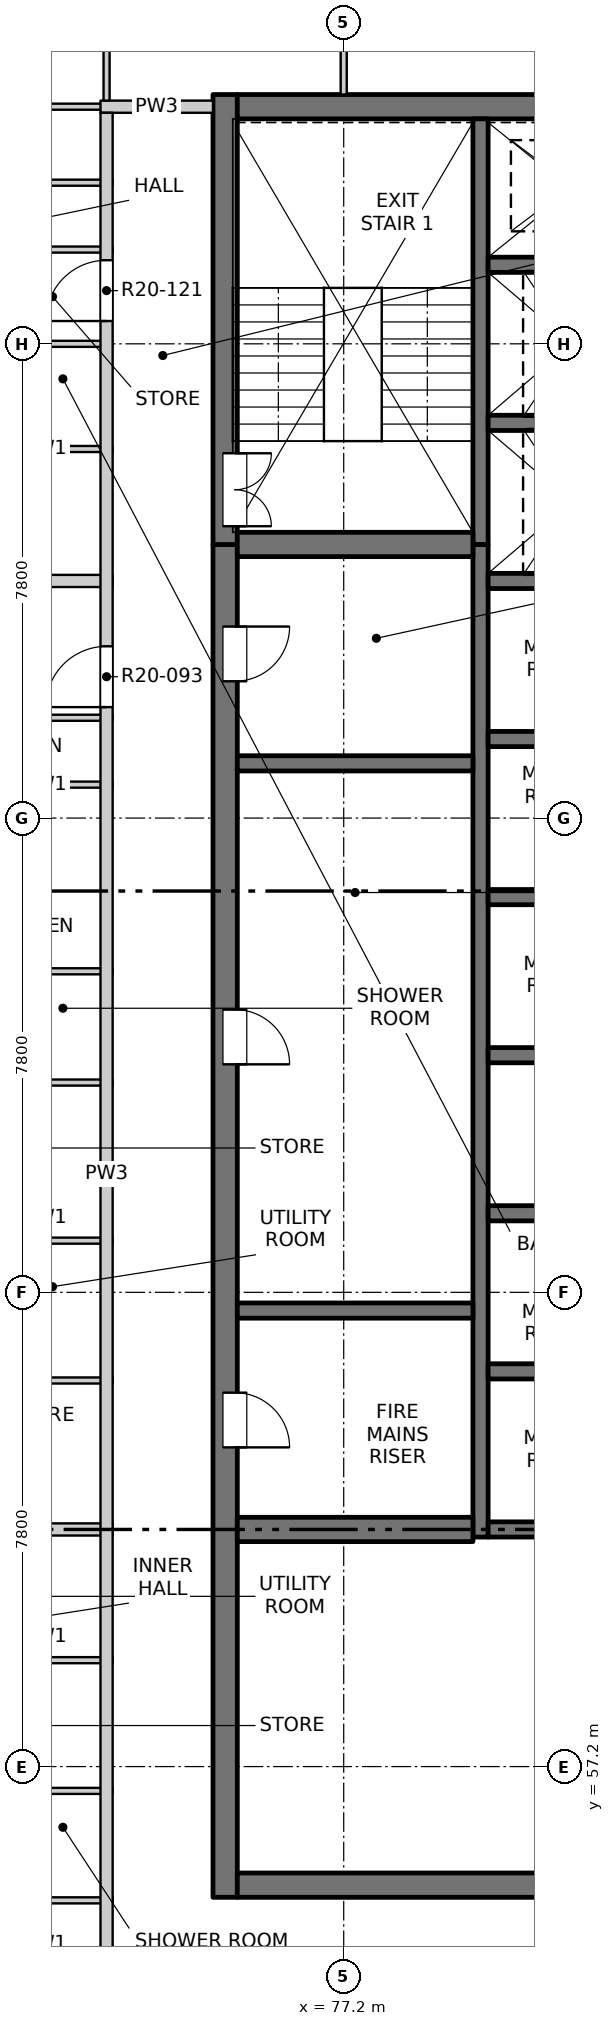
"""IFC4 building model, lengths in metres.
Left out: names, types, materials, properties, quantities, classifications, styles, units other than length and angle.
Written with IfcOpenShell. Run it as: python <this file> out.ifc"""

import sys

from ifc_helpers import new_model, si_unit, direction, frame, frame_2d, origin, place, context, subcontext, project, spatial, rectangle, extrude, element, fill, save


model = new_model("IFC4")
c1 = context("Model", 3, precision=1e-05, world=origin(), true_north=direction((0.0, 1.0)))
c2 = subcontext(c1, "Body", "Model", "MODEL_VIEW")
j1 = project(units=[si_unit("LENGTHUNIT", "METRE"), si_unit("PLANEANGLEUNIT", "RADIAN")], contexts=[c1])
p1 = place(None, origin())
s1 = spatial("IfcSite", under=j1, at=p1, CompositionType="ELEMENT")
p2 = place(p1, origin())
s2 = spatial("IfcBuilding", under=s1, at=p2, CompositionType="ELEMENT")
p3 = place(p2, frame((0.0, 0.0, 210.9)))
s3 = spatial("IfcBuildingStorey", under=s2, at=p3, CompositionType="ELEMENT", Elevation=210.9)
p4 = place(p3, frame((75.25, 55.05, -0.25), z_axis=(0.0, 0.0, 1.0), x_axis=(0.0, 1.0, 0.0)))
e1 = element("IfcWall", 1, at=p4, inside=s3, PredefinedType="SOLIDWALL", context=c2, shape_type="SweptSolid", body=[
    extrude(rectangle(XDim=22.25, YDim=0.4, at=frame_2d((11.125, 0.0))), origin(), (0.0, 0.0, 1.0), 3.4),
])
p5 = place(p4, frame((7.4, 0.0, 0.25)))
e2 = element("IfcOpeningElement", 2, at=p5, cuts=e1, PredefinedType="OPENING", context=c2, shape_type="SweptSolid", body=[
    extrude(rectangle(XDim=0.9, YDim=2.1, at=frame_2d((0.45, 1.05))), frame((0.0, 0.21, 0.0), z_axis=(0.0, -1.0, 0.0), x_axis=(1.0, 0.0, 0.0)), (0.0, 0.0, 1.0), 0.42),
])
p6 = place(p4, frame((13.7, 0.0, 0.25)))
e3 = element("IfcOpeningElement", 3, at=p6, cuts=e1, PredefinedType="OPENING", context=c2, shape_type="SweptSolid", body=[
    extrude(rectangle(XDim=0.9, YDim=2.1, at=frame_2d((0.45, 1.05))), frame((0.0, 0.21, 0.0), z_axis=(0.0, -1.0, 0.0), x_axis=(1.0, 0.0, 0.0)), (0.0, 0.0, 1.0), 0.42),
])
p7 = place(p4, frame((20.0, 0.0, 0.25)))
e4 = element("IfcOpeningElement", 4, at=p7, cuts=e1, PredefinedType="OPENING", context=c2, shape_type="SweptSolid", body=[
    extrude(rectangle(XDim=0.9, YDim=2.1, at=frame_2d((0.45, 1.05))), frame((0.0, 0.21, 0.0), z_axis=(0.0, -1.0, 0.0), x_axis=(1.0, 0.0, 0.0)), (0.0, 0.0, 1.0), 0.42),
])
p8 = place(p3, frame((75.25, 77.3, -0.25), z_axis=(0.0, 0.0, 1.0), x_axis=(0.0, 1.0, 0.0)))
e5 = element("IfcWall", 5, at=p8, inside=s3, PredefinedType="SOLIDWALL", context=c2, shape_type="SweptSolid", body=[
    extrude(rectangle(XDim=7.4, YDim=0.4, at=frame_2d((3.7, 0.0))), origin(), (0.0, 0.0, 1.0), 3.4),
])
p9 = place(p8, frame((0.3, 0.0, 0.25)))
e6 = element("IfcOpeningElement", 6, at=p9, cuts=e5, PredefinedType="OPENING", context=c2, shape_type="SweptSolid", body=[
    extrude(rectangle(XDim=1.2, YDim=2.1, at=frame_2d((0.6, 1.05))), frame((0.0, 0.21, 0.0), z_axis=(0.0, -1.0, 0.0), x_axis=(1.0, 0.0, 0.0)), (0.0, 0.0, 1.0), 0.42),
])
p10 = place(p3, frame((75.45, 55.25, -0.25), z_axis=(0.0, 0.0, 1.0), x_axis=(1.0, 0.0, 0.0)))
e7 = element("IfcWall", 7, at=p10, inside=s3, PredefinedType="SOLIDWALL", context=c2, shape_type="SweptSolid", body=[
    extrude(rectangle(XDim=19.1, YDim=0.4, at=frame_2d((9.55, 0.0))), origin(), (0.0, 0.0, 1.0), 3.4),
])
p11 = place(p10, frame((8.8, 0.0, 0.25)))
e8 = element("IfcOpeningElement", 8, at=p11, cuts=e7, PredefinedType="OPENING", context=c2, shape_type="SweptSolid", body=[
    extrude(rectangle(XDim=1.5, YDim=2.1, at=frame_2d((0.75, 1.05))), frame((0.0, 0.21, 0.0), z_axis=(0.0, -1.0, 0.0), x_axis=(1.0, 0.0, 0.0)), (0.0, 0.0, 1.0), 0.42),
])
p12 = place(p3, frame((75.45, 84.5, -0.25), z_axis=(0.0, 0.0, 1.0), x_axis=(1.0, 0.0, 0.0)))
e9 = element("IfcWall", 9, at=p12, inside=s3, PredefinedType="SOLIDWALL", context=c2, shape_type="SweptSolid", body=[
    extrude(rectangle(XDim=19.1, YDim=0.4, at=frame_2d((9.55, 0.0))), origin(), (0.0, 0.0, 1.0), 3.4),
])
p13 = place(p3, frame((79.45, 60.975, -0.25), z_axis=(0.0, 0.0, 1.0), x_axis=(0.0, 1.0, 0.0)))
e10 = element("IfcWall", 10, at=p13, inside=s3, PredefinedType="SOLIDWALL", context=c2, shape_type="SweptSolid", body=[
    extrude(rectangle(XDim=16.325, YDim=0.25, at=frame_2d((8.163, 0.0))), origin(), (0.0, 0.0, 1.0), 3.4),
])
p14 = place(p3, frame((79.45, 77.3, -0.25), z_axis=(0.0, 0.0, 1.0), x_axis=(0.0, 1.0, 0.0)))
e11 = element("IfcWall", 11, at=p14, inside=s3, PredefinedType="SOLIDWALL", context=c2, shape_type="SweptSolid", body=[
    extrude(rectangle(XDim=7.0, YDim=0.25, at=frame_2d((3.5, 0.0))), origin(), (0.0, 0.0, 1.0), 3.4),
])
for number, where, z_axis, x_axis in (
    (12, (79.575, 61.1, -0.25), (0.0, 0.0, 1.0), (1.0, 0.0, 0.0)),
    (13, (79.575, 63.7, -0.25), (0.0, 0.0, 1.0), (1.0, 0.0, 0.0)),
    (14, (79.575, 66.3, -0.25), (0.0, 0.0, 1.0), (1.0, 0.0, 0.0)),
    (15, (79.575, 68.9, -0.25), (0.0, 0.0, 1.0), (1.0, 0.0, 0.0)),
    (16, (79.575, 71.5, -0.25), (0.0, 0.0, 1.0), (1.0, 0.0, 0.0)),
    (17, (79.575, 74.1, -0.25), (0.0, 0.0, 1.0), (1.0, 0.0, 0.0)),
    (18, (79.575, 76.7, -0.25), (0.0, 0.0, 1.0), (1.0, 0.0, 0.0)),
    (19, (79.575, 79.3, -0.25), (0.0, 0.0, 1.0), (1.0, 0.0, 0.0)),
    (20, (79.575, 81.9, -0.25), (0.0, 0.0, 1.0), (1.0, 0.0, 0.0)),
):
    element("IfcWall", number, at=place(p3, frame(where, z_axis=z_axis, x_axis=x_axis)), inside=s3, PredefinedType="SOLIDWALL", context=c2, shape_type="SweptSolid", body=[
        extrude(rectangle(XDim=3.0, YDim=0.25, at=frame_2d((1.5, 0.0))), origin(), (0.0, 0.0, 1.0), 3.4),
    ])
p15 = place(p3, frame((75.45, 61.1, -0.25), z_axis=(0.0, 0.0, 1.0), x_axis=(1.0, 0.0, 0.0)))
e21 = element("IfcWall", 21, at=p15, inside=s3, PredefinedType="SOLIDWALL", context=c2, shape_type="SweptSolid", body=[
    extrude(rectangle(XDim=3.875, YDim=0.4, at=frame_2d((1.938, 0.0))), origin(), (0.0, 0.0, 1.0), 3.4),
])
for number, where, z_axis, x_axis in (
    (22, (75.45, 64.7, -0.25), (0.0, 0.0, 1.0), (1.0, 0.0, 0.0)),
    (23, (75.45, 73.7, -0.25), (0.0, 0.0, 1.0), (1.0, 0.0, 0.0)),
):
    element("IfcWall", number, at=place(p3, frame(where, z_axis=z_axis, x_axis=x_axis)), inside=s3, PredefinedType="SOLIDWALL", context=c2, shape_type="SweptSolid", body=[
        extrude(rectangle(XDim=3.875, YDim=0.25, at=frame_2d((1.938, 0.0))), origin(), (0.0, 0.0, 1.0), 3.4),
    ])
p16 = place(p3, frame((75.45, 77.3, -0.25), z_axis=(0.0, 0.0, 1.0), x_axis=(1.0, 0.0, 0.0)))
e24 = element("IfcWall", 24, at=p16, inside=s3, PredefinedType="SOLIDWALL", context=c2, shape_type="SweptSolid", body=[
    extrude(rectangle(XDim=3.875, YDim=0.4, at=frame_2d((1.938, 0.0))), origin(), (0.0, 0.0, 1.0), 3.4),
])
for number, where, z_axis, x_axis in (
    (25, (71.18, 55.0, 0.0), (0.0, 0.0, 1.0), (1.0, 0.0, 0.0)),
    (26, (71.18, 56.8, 0.0), (0.0, 0.0, 1.0), (1.0, 0.0, 0.0)),
    (27, (71.18, 58.95, 0.0), (0.0, 0.0, 1.0), (1.0, 0.0, 0.0)),
):
    element("IfcWall", number, at=place(p3, frame(where, z_axis=z_axis, x_axis=x_axis)), inside=s3, PredefinedType="PARTITIONING", context=c2, shape_type="SweptSolid", body=[
        extrude(rectangle(XDim=2.22, YDim=0.1, at=frame_2d((1.11, 0.0))), origin(), (0.0, 0.0, 1.0), 3.15),
    ])
p17 = place(p3, frame((61.9, 61.1, 0.0), z_axis=(0.0, 0.0, 1.0), x_axis=(1.0, 0.0, 0.0)))
e28 = element("IfcWall", 28, at=p17, inside=s3, PredefinedType="PARTITIONING", context=c2, shape_type="SweptSolid", body=[
    extrude(rectangle(XDim=11.5, YDim=0.2, at=frame_2d((5.75, 0.0))), origin(), (0.0, 0.0, 1.0), 2.55),
])
for number, where, z_axis, x_axis in (
    (29, (71.18, 63.55, 0.0), (0.0, 0.0, 1.0), (1.0, 0.0, 0.0)),
    (30, (71.18, 65.85, 0.0), (0.0, 0.0, 1.0), (1.0, 0.0, 0.0)),
    (31, (71.18, 68.45, 0.0), (0.0, 0.0, 1.0), (1.0, 0.0, 0.0)),
    (32, (71.18, 70.28, 0.0), (0.0, 0.0, 1.0), (1.0, 0.0, 0.0)),
    (33, (71.18, 73.35, 0.0), (0.0, 0.0, 1.0), (1.0, 0.0, 0.0)),
    (34, (71.18, 74.45, 0.0), (0.0, 0.0, 1.0), (1.0, 0.0, 0.0)),
):
    element("IfcWall", number, at=place(p3, frame(where, z_axis=z_axis, x_axis=x_axis)), inside=s3, PredefinedType="PARTITIONING", context=c2, shape_type="SweptSolid", body=[
        extrude(rectangle(XDim=2.22, YDim=0.1, at=frame_2d((1.11, 0.0))), origin(), (0.0, 0.0, 1.0), 3.15),
    ])
p18 = place(p3, frame((61.9, 76.7, 0.0), z_axis=(0.0, 0.0, 1.0), x_axis=(1.0, 0.0, 0.0)))
e35 = element("IfcWall", 35, at=p18, inside=s3, PredefinedType="PARTITIONING", context=c2, shape_type="SweptSolid", body=[
    extrude(rectangle(XDim=11.5, YDim=0.2, at=frame_2d((5.75, 0.0))), origin(), (0.0, 0.0, 1.0), 2.55),
])
for number, where, z_axis, x_axis in (
    (36, (71.18, 78.87, 0.0), (0.0, 0.0, 1.0), (1.0, 0.0, 0.0)),
    (37, (71.18, 80.6, 0.0), (0.0, 0.0, 1.0), (1.0, 0.0, 0.0)),
    (38, (71.18, 82.15, 0.0), (0.0, 0.0, 1.0), (1.0, 0.0, 0.0)),
    (39, (71.18, 83.25, 0.0), (0.0, 0.0, 1.0), (1.0, 0.0, 0.0)),
):
    element("IfcWall", number, at=place(p3, frame(where, z_axis=z_axis, x_axis=x_axis)), inside=s3, PredefinedType="PARTITIONING", context=c2, shape_type="SweptSolid", body=[
        extrude(rectangle(XDim=2.22, YDim=0.1, at=frame_2d((1.11, 0.0))), origin(), (0.0, 0.0, 1.0), 3.15),
    ])
p19 = place(p3, frame((61.9, 84.5, 0.0), z_axis=(0.0, 0.0, 1.0), x_axis=(1.0, 0.0, 0.0)))
e40 = element("IfcWall", 40, at=p19, inside=s3, PredefinedType="PARTITIONING", context=c2, shape_type="SweptSolid", body=[
    extrude(rectangle(XDim=11.5, YDim=0.1, at=frame_2d((5.75, 0.0))), origin(), (0.0, 0.0, 1.0), 3.15),
])
p20 = place(p19, frame((7.965, 0.0, 0.0)))
e41 = element("IfcOpeningElement", 41, at=p20, cuts=e40, PredefinedType="OPENING", context=c2, shape_type="SweptSolid", body=[
    extrude(rectangle(XDim=0.9, YDim=2.1, at=frame_2d((0.45, 1.05))), frame((0.0, 0.06, 0.0), z_axis=(0.0, -1.0, 0.0), x_axis=(1.0, 0.0, 0.0)), (0.0, 0.0, 1.0), 0.12),
])
p21 = place(p3, frame((73.2, 84.5, 0.0), z_axis=(0.0, 0.0, 1.0), x_axis=(1.0, 0.0, 0.0)))
e42 = element("IfcWall", 42, at=p21, inside=s3, PredefinedType="PARTITIONING", context=c2, shape_type="SweptSolid", body=[
    extrude(rectangle(XDim=1.85, YDim=0.2, at=frame_2d((0.925, 0.0))), origin(), (0.0, 0.0, 1.0), 3.15),
])
p22 = place(p3, frame((73.3, 49.5, 0.0), z_axis=(0.0, 0.0, 1.0), x_axis=(0.0, 1.0, 0.0)))
e43 = element("IfcWall", 43, at=p22, inside=s3, PredefinedType="PARTITIONING", context=c2, shape_type="SweptSolid", body=[
    extrude(rectangle(XDim=34.9, YDim=0.2, at=frame_2d((17.45, 0.0))), origin(), (0.0, 0.0, 1.0), 3.15),
])
p23 = place(p22, frame((3.225, 0.0, 0.0)))
e44 = element("IfcOpeningElement", 44, at=p23, cuts=e43, PredefinedType="OPENING", context=c2, shape_type="SweptSolid", body=[
    extrude(rectangle(XDim=1.0, YDim=2.1, at=frame_2d((0.5, 1.05))), frame((0.0, 0.11, 0.0), z_axis=(0.0, -1.0, 0.0), x_axis=(1.0, 0.0, 0.0)), (0.0, 0.0, 1.0), 0.22),
])
p24 = place(p22, frame((25.125, 0.0, 0.0)))
e45 = element("IfcOpeningElement", 45, at=p24, cuts=e43, PredefinedType="OPENING", context=c2, shape_type="SweptSolid", body=[
    extrude(rectangle(XDim=1.0, YDim=2.1, at=frame_2d((0.5, 1.05))), frame((0.0, 0.11, 0.0), z_axis=(0.0, -1.0, 0.0), x_axis=(1.0, 0.0, 0.0)), (0.0, 0.0, 1.0), 0.22),
])
p25 = place(p22, frame((31.475, 0.0, 0.0)))
e46 = element("IfcOpeningElement", 46, at=p25, cuts=e43, PredefinedType="OPENING", context=c2, shape_type="SweptSolid", body=[
    extrude(rectangle(XDim=1.0, YDim=2.1, at=frame_2d((0.5, 1.05))), frame((0.0, 0.11, 0.0), z_axis=(0.0, -1.0, 0.0), x_axis=(1.0, 0.0, 0.0)), (0.0, 0.0, 1.0), 0.22),
])
p26 = place(p3, frame((73.3, 84.6, 0.0), z_axis=(0.0, 0.0, 1.0), x_axis=(0.0, 1.0, 0.0)))
e47 = element("IfcWall", 47, at=p26, inside=s3, PredefinedType="PARTITIONING", context=c2, shape_type="SweptSolid", body=[
    extrude(rectangle(XDim=3.5, YDim=0.1, at=frame_2d((1.75, 0.0))), origin(), (0.0, 0.0, 1.0), 3.15),
])
p27 = place(p26, frame((1.4, 0.0, 0.0)))
e48 = element("IfcOpeningElement", 48, at=p27, cuts=e47, PredefinedType="OPENING", context=c2, shape_type="SweptSolid", body=[
    extrude(rectangle(XDim=0.9, YDim=2.1, at=frame_2d((0.45, 1.05))), frame((0.0, 0.06, 0.0), z_axis=(0.0, -1.0, 0.0), x_axis=(1.0, 0.0, 0.0)), (0.0, 0.0, 1.0), 0.12),
])
p28 = place(p3, frame((77.2, 84.7, 0.0), z_axis=(0.0, 0.0, 1.0), x_axis=(0.0, 1.0, 0.0)))
e49 = element("IfcWall", 49, at=p28, inside=s3, PredefinedType="PARTITIONING", context=c2, shape_type="SweptSolid", body=[
    extrude(rectangle(XDim=3.4, YDim=0.1, at=frame_2d((1.7, 0.0))), origin(), (0.0, 0.0, 1.0), 3.15),
])
p29 = place(p28, frame((1.3, 0.0, 0.0)))
e50 = element("IfcOpeningElement", 50, at=p29, cuts=e49, PredefinedType="OPENING", context=c2, shape_type="SweptSolid", body=[
    extrude(rectangle(XDim=0.9, YDim=2.1, at=frame_2d((0.45, 1.05))), frame((0.0, 0.06, 0.0), z_axis=(0.0, -1.0, 0.0), x_axis=(1.0, 0.0, 0.0)), (0.0, 0.0, 1.0), 0.12),
])
p30 = place(p5, origin())
e51 = element("IfcDoor", 51, at=p30, inside=s3, OperationType="SINGLE_SWING_RIGHT", PredefinedType="DOOR", context=c2, shape_type="SweptSolid", body=[
    extrude(rectangle(XDim=0.9, YDim=2.1, at=frame_2d((0.45, 1.05))), frame((0.0, -0.135, 0.0), z_axis=(0.0, -1.0, 0.0), x_axis=(1.0, 0.0, 0.0)), (0.0, 0.0, 1.0), 0.05),
])
fill(e2, e51)
p31 = place(p6, origin())
e52 = element("IfcDoor", 52, at=p31, inside=s3, OperationType="SINGLE_SWING_RIGHT", PredefinedType="DOOR", context=c2, shape_type="SweptSolid", body=[
    extrude(rectangle(XDim=0.9, YDim=2.1, at=frame_2d((0.45, 1.05))), frame((0.0, -0.135, 0.0), z_axis=(0.0, -1.0, 0.0), x_axis=(1.0, 0.0, 0.0)), (0.0, 0.0, 1.0), 0.05),
])
fill(e3, e52)
p32 = place(p24, origin())
e53 = element("IfcDoor", 53, at=p32, inside=s3, OperationType="SINGLE_SWING_RIGHT", PredefinedType="DOOR", context=c2, shape_type="SweptSolid", body=[
    extrude(rectangle(XDim=1.0, YDim=2.1, at=frame_2d((0.5, 1.05))), frame((0.0, 0.025, 0.0), z_axis=(0.0, -1.0, 0.0), x_axis=(1.0, 0.0, 0.0)), (0.0, 0.0, 1.0), 0.05),
])
fill(e45, e53)
p33 = place(p7, origin())
e54 = element("IfcDoor", 54, at=p33, inside=s3, OperationType="SINGLE_SWING_LEFT", PredefinedType="DOOR", context=c2, shape_type="SweptSolid", body=[
    extrude(rectangle(XDim=0.9, YDim=2.1, at=frame_2d((0.45, 1.05))), frame((0.0, -0.135, 0.0), z_axis=(0.0, -1.0, 0.0), x_axis=(1.0, 0.0, 0.0)), (0.0, 0.0, 1.0), 0.05),
])
fill(e4, e54)
p34 = place(p9, origin())
e55 = element("IfcDoor", 55, at=p34, inside=s3, OperationType="DOUBLE_DOOR_SINGLE_SWING", PredefinedType="DOOR", context=c2, shape_type="SweptSolid", body=[
    extrude(rectangle(XDim=1.2, YDim=2.1, at=frame_2d((0.6, 1.05))), frame((0.0, -0.135, 0.0), z_axis=(0.0, -1.0, 0.0), x_axis=(1.0, 0.0, 0.0)), (0.0, 0.0, 1.0), 0.05),
])
fill(e6, e55)
p35 = place(p25, origin())
e56 = element("IfcDoor", 56, at=p35, inside=s3, OperationType="SINGLE_SWING_LEFT", PredefinedType="DOOR", context=c2, shape_type="SweptSolid", body=[
    extrude(rectangle(XDim=1.0, YDim=2.1, at=frame_2d((0.5, 1.05))), frame((0.0, 0.025, 0.0), z_axis=(0.0, -1.0, 0.0), x_axis=(1.0, 0.0, 0.0)), (0.0, 0.0, 1.0), 0.05),
])
fill(e46, e56)
save(model, sys.argv[1])
